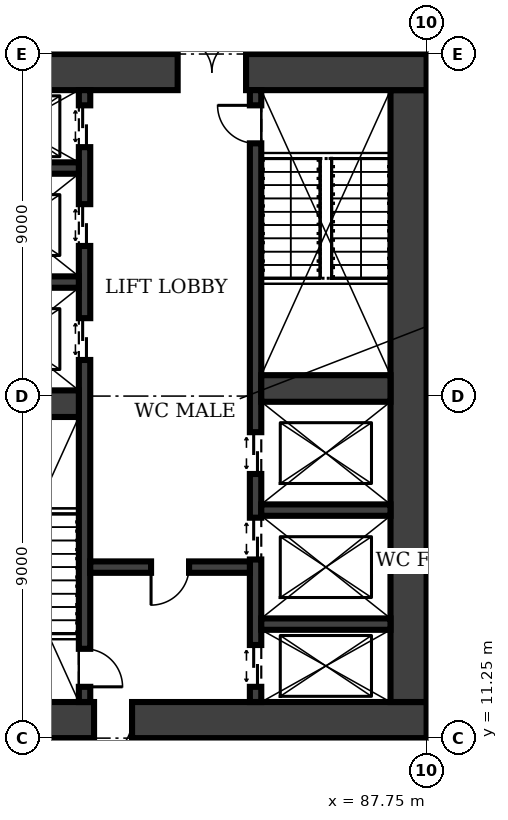
"""IFC4 building model, lengths in metres.
Left out: names, types, materials, properties, quantities, classifications, styles, units other than length and angle.
Written with IfcOpenShell. Run it as: python <this file> out.ifc"""

import sys

from ifc_helpers import new_model, si_unit, direction, frame, frame_2d, origin, place, context, subcontext, project, spatial, rectangle, extrude, element, fill, save


model = new_model("IFC4")
c1 = context("Model", 3, precision=1e-05, world=origin(), true_north=direction((0.0, 1.0)))
c2 = subcontext(c1, "Body", "Model", "MODEL_VIEW")
j1 = project(units=[si_unit("LENGTHUNIT", "METRE"), si_unit("PLANEANGLEUNIT", "RADIAN")], contexts=[c1])
p1 = place(None, origin())
s1 = spatial("IfcSite", under=j1, at=p1, CompositionType="ELEMENT")
p2 = place(p1, origin())
s2 = spatial("IfcBuilding", under=s1, at=p2, CompositionType="ELEMENT")
p3 = place(p2, origin())
s3 = spatial("IfcBuildingStorey", under=s2, at=p3, CompositionType="ELEMENT", Elevation=0.0)
p4 = place(p3, frame((74.25, 11.725, -0.4), z_axis=(0.0, 0.0, 1.0), x_axis=(1.0, 0.0, 0.0)))
e1 = element("IfcWall", 1, at=p4, inside=s3, PredefinedType="SHEAR", context=c2, shape_type="SweptSolid", body=[
    extrude(rectangle(XDim=13.5, YDim=0.95, at=frame_2d((6.75, 0.0))), origin(), (0.0, 0.0, 1.0), 6.4),
])
p5 = place(p4, frame((4.75, 0.0, 0.4)))
e2 = element("IfcOpeningElement", 2, at=p5, cuts=e1, PredefinedType="OPENING", context=c2, shape_type="SweptSolid", body=[
    extrude(rectangle(XDim=1.0, YDim=2.1, at=frame_2d((0.5, 1.05))), frame((0.0, 0.485, 0.0), z_axis=(0.0, -1.0, 0.0), x_axis=(1.0, 0.0, 0.0)), (0.0, 0.0, 1.0), 0.97),
])
p6 = place(p3, frame((87.275, 12.2, -0.4), z_axis=(0.0, 0.0, 1.0), x_axis=(0.0, 1.0, 0.0)))
e3 = element("IfcWall", 3, at=p6, inside=s3, PredefinedType="SHEAR", context=c2, shape_type="SweptSolid", body=[
    extrude(rectangle(XDim=16.1, YDim=0.95, at=frame_2d((8.05, 0.0))), origin(), (0.0, 0.0, 1.0), 6.4),
])
p7 = place(p3, frame((87.75, 28.775, -0.4), z_axis=(0.0, 0.0, 1.0), x_axis=(-1.0, 0.0, 0.0)))
e4 = element("IfcWall", 4, at=p7, inside=s3, PredefinedType="SHEAR", context=c2, shape_type="SweptSolid", body=[
    extrude(rectangle(XDim=13.5, YDim=0.95, at=frame_2d((6.75, 0.0))), origin(), (0.0, 0.0, 1.0), 6.4),
])
p8 = place(p7, frame((4.75, 0.0, 0.4)))
e5 = element("IfcOpeningElement", 5, at=p8, cuts=e4, PredefinedType="OPENING", context=c2, shape_type="SweptSolid", body=[
    extrude(rectangle(XDim=1.8, YDim=2.1, at=frame_2d((0.9, 1.05))), frame((0.0, 0.485, 0.0), z_axis=(0.0, -1.0, 0.0), x_axis=(1.0, 0.0, 0.0)), (0.0, 0.0, 1.0), 0.97),
])
p9 = place(p3, frame((78.75, 12.2, -0.4), z_axis=(0.0, 0.0, 1.0), x_axis=(0.0, 1.0, 0.0)))
e6 = element("IfcWall", 6, at=p9, inside=s3, PredefinedType="SHEAR", context=c2, shape_type="SweptSolid", body=[
    extrude(rectangle(XDim=16.1, YDim=0.3, at=frame_2d((8.05, 0.0))), origin(), (0.0, 0.0, 1.0), 6.4),
])
p10 = place(p9, frame((0.4, 0.0, 0.4)))
e7 = element("IfcOpeningElement", 7, at=p10, cuts=e6, PredefinedType="OPENING", context=c2, shape_type="SweptSolid", body=[
    extrude(rectangle(XDim=1.0, YDim=2.1, at=frame_2d((0.5, 1.05))), frame((0.0, 0.16, 0.0), z_axis=(0.0, -1.0, 0.0), x_axis=(1.0, 0.0, 0.0)), (0.0, 0.0, 1.0), 0.32),
])
p11 = place(p9, frame((9.0, 0.0, 0.4)))
e8 = element("IfcOpeningElement", 8, at=p11, cuts=e6, PredefinedType="OPENING", context=c2, shape_type="SweptSolid", body=[
    extrude(rectangle(XDim=1.1, YDim=2.1, at=frame_2d((0.55, 1.05))), frame((0.0, 0.16, 0.0), z_axis=(0.0, -1.0, 0.0), x_axis=(1.0, 0.0, 0.0)), (0.0, 0.0, 1.0), 0.32),
])
p12 = place(p9, frame((12.0, 0.0, 0.4)))
e9 = element("IfcOpeningElement", 9, at=p12, cuts=e6, PredefinedType="OPENING", context=c2, shape_type="SweptSolid", body=[
    extrude(rectangle(XDim=1.1, YDim=2.1, at=frame_2d((0.55, 1.05))), frame((0.0, 0.16, 0.0), z_axis=(0.0, -1.0, 0.0), x_axis=(1.0, 0.0, 0.0)), (0.0, 0.0, 1.0), 0.32),
])
p13 = place(p9, frame((14.6, 0.0, 0.4)))
e10 = element("IfcOpeningElement", 10, at=p13, cuts=e6, PredefinedType="OPENING", context=c2, shape_type="SweptSolid", body=[
    extrude(rectangle(XDim=1.1, YDim=2.1, at=frame_2d((0.55, 1.05))), frame((0.0, 0.16, 0.0), z_axis=(0.0, -1.0, 0.0), x_axis=(1.0, 0.0, 0.0)), (0.0, 0.0, 1.0), 0.32),
])
p14 = place(p3, frame((83.25, 12.2, -0.4), z_axis=(0.0, 0.0, 1.0), x_axis=(0.0, 1.0, 0.0)))
e11 = element("IfcWall", 11, at=p14, inside=s3, PredefinedType="SHEAR", context=c2, shape_type="SweptSolid", body=[
    extrude(rectangle(XDim=16.1, YDim=0.3, at=frame_2d((8.05, 0.0))), origin(), (0.0, 0.0, 1.0), 6.4),
])
p15 = place(p14, frame((14.7, 0.0, 0.4)))
e12 = element("IfcOpeningElement", 12, at=p15, cuts=e11, PredefinedType="OPENING", context=c2, shape_type="SweptSolid", body=[
    extrude(rectangle(XDim=1.0, YDim=2.1, at=frame_2d((0.5, 1.05))), frame((0.0, 0.16, 0.0), z_axis=(0.0, -1.0, 0.0), x_axis=(1.0, 0.0, 0.0)), (0.0, 0.0, 1.0), 0.32),
])
p16 = place(p14, frame((0.4, 0.0, 0.4)))
e13 = element("IfcOpeningElement", 13, at=p16, cuts=e11, PredefinedType="OPENING", context=c2, shape_type="SweptSolid", body=[
    extrude(rectangle(XDim=1.1, YDim=2.1, at=frame_2d((0.55, 1.05))), frame((0.0, 0.16, 0.0), z_axis=(0.0, -1.0, 0.0), x_axis=(1.0, 0.0, 0.0)), (0.0, 0.0, 1.0), 0.32),
])
p17 = place(p14, frame((3.75, 0.0, 0.4)))
e14 = element("IfcOpeningElement", 14, at=p17, cuts=e11, PredefinedType="OPENING", context=c2, shape_type="SweptSolid", body=[
    extrude(rectangle(XDim=1.1, YDim=2.1, at=frame_2d((0.55, 1.05))), frame((0.0, 0.16, 0.0), z_axis=(0.0, -1.0, 0.0), x_axis=(1.0, 0.0, 0.0)), (0.0, 0.0, 1.0), 0.32),
])
p18 = place(p14, frame((6.0, 0.0, 0.4)))
e15 = element("IfcOpeningElement", 15, at=p18, cuts=e11, PredefinedType="OPENING", context=c2, shape_type="SweptSolid", body=[
    extrude(rectangle(XDim=1.1, YDim=2.1, at=frame_2d((0.55, 1.05))), frame((0.0, 0.16, 0.0), z_axis=(0.0, -1.0, 0.0), x_axis=(1.0, 0.0, 0.0)), (0.0, 0.0, 1.0), 0.32),
])
p19 = place(p3, frame((75.2, 20.05, -0.4), z_axis=(0.0, 0.0, 1.0), x_axis=(1.0, 0.0, 0.0)))
e16 = element("IfcWall", 16, at=p19, inside=s3, PredefinedType="SHEAR", context=c2, shape_type="SweptSolid", body=[
    extrude(rectangle(XDim=3.4, YDim=0.7, at=frame_2d((1.7, 0.0))), origin(), (0.0, 0.0, 1.0), 6.4),
])
p20 = place(p3, frame((78.9, 15.75, -0.4), z_axis=(0.0, 0.0, 1.0), x_axis=(1.0, 0.0, 0.0)))
e17 = element("IfcWall", 17, at=p20, inside=s3, PredefinedType="SHEAR", context=c2, shape_type="SweptSolid", body=[
    extrude(rectangle(XDim=4.2, YDim=0.3, at=frame_2d((2.1, 0.0))), origin(), (0.0, 0.0, 1.0), 6.4),
])
p21 = place(p20, frame((1.6, 0.0, 0.4)))
e18 = element("IfcOpeningElement", 18, at=p21, cuts=e17, PredefinedType="OPENING", context=c2, shape_type="SweptSolid", body=[
    extrude(rectangle(XDim=1.0, YDim=2.1, at=frame_2d((0.5, 1.05))), frame((0.0, 0.16, 0.0), z_axis=(0.0, -1.0, 0.0), x_axis=(1.0, 0.0, 0.0)), (0.0, 0.0, 1.0), 0.32),
])
for number, where, z_axis, x_axis in (
    (19, (83.4, 14.25, -0.4), (0.0, 0.0, 1.0), (1.0, 0.0, 0.0)),
    (20, (83.4, 17.25, -0.4), (0.0, 0.0, 1.0), (1.0, 0.0, 0.0)),
):
    element("IfcWall", number, at=place(p3, frame(where, z_axis=z_axis, x_axis=x_axis)), inside=s3, PredefinedType="SHEAR", context=c2, shape_type="SweptSolid", body=[
        extrude(rectangle(XDim=3.4, YDim=0.3, at=frame_2d((1.7, 0.0))), origin(), (0.0, 0.0, 1.0), 6.4),
    ])
p22 = place(p3, frame((83.4, 20.45, -0.4), z_axis=(0.0, 0.0, 1.0), x_axis=(1.0, 0.0, 0.0)))
e21 = element("IfcWall", 21, at=p22, inside=s3, PredefinedType="SHEAR", context=c2, shape_type="SweptSolid", body=[
    extrude(rectangle(XDim=3.4, YDim=0.7, at=frame_2d((1.7, 0.0))), origin(), (0.0, 0.0, 1.0), 6.4),
])
for number, where, z_axis, x_axis in (
    (22, (75.2, 23.25, -0.4), (0.0, 0.0, 1.0), (1.0, 0.0, 0.0)),
    (23, (75.2, 26.25, -0.4), (0.0, 0.0, 1.0), (1.0, 0.0, 0.0)),
):
    element("IfcWall", number, at=place(p3, frame(where, z_axis=z_axis, x_axis=x_axis)), inside=s3, PredefinedType="SHEAR", context=c2, shape_type="SweptSolid", body=[
        extrude(rectangle(XDim=3.4, YDim=0.3, at=frame_2d((1.7, 0.0))), origin(), (0.0, 0.0, 1.0), 6.4),
    ])
p23 = place(p5, frame((1.0, 0.0, 0.0), z_axis=(0.0, 0.0, 1.0), x_axis=(-1.0, 0.0, 0.0)))
e24 = element("IfcDoor", 24, at=p23, inside=s3, OperationType="SINGLE_SWING_RIGHT", PredefinedType="DOOR", context=c2, shape_type="SweptSolid", body=[
    extrude(rectangle(XDim=1.0, YDim=2.1, at=frame_2d((0.5, 1.05))), frame((0.0, 0.025, 0.0), z_axis=(0.0, -1.0, 0.0), x_axis=(1.0, 0.0, 0.0)), (0.0, 0.0, 1.0), 0.05),
])
fill(e2, e24)
p24 = place(p8, frame((1.8, 0.0, 0.0), z_axis=(0.0, 0.0, 1.0), x_axis=(-1.0, 0.0, 0.0)))
e25 = element("IfcDoor", 25, at=p24, inside=s3, OperationType="DOUBLE_DOOR_SINGLE_SWING", PredefinedType="DOOR", context=c2, shape_type="SweptSolid", body=[
    extrude(rectangle(XDim=1.8, YDim=2.1, at=frame_2d((0.9, 1.05))), frame((0.0, 0.025, 0.0), z_axis=(0.0, -1.0, 0.0), x_axis=(1.0, 0.0, 0.0)), (0.0, 0.0, 1.0), 0.05),
])
fill(e5, e25)
p25 = place(p21, frame((1.0, 0.0, 0.0), z_axis=(0.0, 0.0, 1.0), x_axis=(-1.0, 0.0, 0.0)))
e26 = element("IfcDoor", 26, at=p25, inside=s3, OperationType="SINGLE_SWING_RIGHT", PredefinedType="DOOR", context=c2, shape_type="SweptSolid", body=[
    extrude(rectangle(XDim=1.0, YDim=2.1, at=frame_2d((0.5, 1.05))), frame((0.0, 0.025, 0.0), z_axis=(0.0, -1.0, 0.0), x_axis=(1.0, 0.0, 0.0)), (0.0, 0.0, 1.0), 0.05),
])
fill(e18, e26)
p26 = place(p10, frame((1.0, 0.0, 0.0), z_axis=(0.0, 0.0, 1.0), x_axis=(-1.0, 0.0, 0.0)))
e27 = element("IfcDoor", 27, at=p26, inside=s3, OperationType="SINGLE_SWING_RIGHT", PredefinedType="DOOR", context=c2, shape_type="SweptSolid", body=[
    extrude(rectangle(XDim=1.0, YDim=2.1, at=frame_2d((0.5, 1.05))), frame((0.0, 0.025, 0.0), z_axis=(0.0, -1.0, 0.0), x_axis=(1.0, 0.0, 0.0)), (0.0, 0.0, 1.0), 0.05),
])
fill(e7, e27)
p27 = place(p15, origin())
e28 = element("IfcDoor", 28, at=p27, inside=s3, OperationType="SINGLE_SWING_RIGHT", PredefinedType="DOOR", context=c2, shape_type="SweptSolid", body=[
    extrude(rectangle(XDim=1.0, YDim=2.1, at=frame_2d((0.5, 1.05))), frame((0.0, 0.025, 0.0), z_axis=(0.0, -1.0, 0.0), x_axis=(1.0, 0.0, 0.0)), (0.0, 0.0, 1.0), 0.05),
])
fill(e12, e28)
p28 = place(p16, origin())
e29 = element("IfcDoor", 29, at=p28, inside=s3, OperationType="DOUBLE_DOOR_SLIDING", PredefinedType="DOOR", context=c2, shape_type="SweptSolid", body=[
    extrude(rectangle(XDim=1.1, YDim=2.1, at=frame_2d((0.55, 1.05))), frame((0.0, 0.025, 0.0), z_axis=(0.0, -1.0, 0.0), x_axis=(1.0, 0.0, 0.0)), (0.0, 0.0, 1.0), 0.05),
])
fill(e13, e29)
p29 = place(p11, origin())
e30 = element("IfcDoor", 30, at=p29, inside=s3, OperationType="DOUBLE_DOOR_SLIDING", PredefinedType="DOOR", context=c2, shape_type="SweptSolid", body=[
    extrude(rectangle(XDim=1.1, YDim=2.1, at=frame_2d((0.55, 1.05))), frame((0.0, 0.025, 0.0), z_axis=(0.0, -1.0, 0.0), x_axis=(1.0, 0.0, 0.0)), (0.0, 0.0, 1.0), 0.05),
])
fill(e8, e30)
p30 = place(p12, origin())
e31 = element("IfcDoor", 31, at=p30, inside=s3, OperationType="DOUBLE_DOOR_SLIDING", PredefinedType="DOOR", context=c2, shape_type="SweptSolid", body=[
    extrude(rectangle(XDim=1.1, YDim=2.1, at=frame_2d((0.55, 1.05))), frame((0.0, 0.025, 0.0), z_axis=(0.0, -1.0, 0.0), x_axis=(1.0, 0.0, 0.0)), (0.0, 0.0, 1.0), 0.05),
])
fill(e9, e31)
p31 = place(p13, origin())
e32 = element("IfcDoor", 32, at=p31, inside=s3, OperationType="DOUBLE_DOOR_SLIDING", PredefinedType="DOOR", context=c2, shape_type="SweptSolid", body=[
    extrude(rectangle(XDim=1.1, YDim=2.1, at=frame_2d((0.55, 1.05))), frame((0.0, 0.025, 0.0), z_axis=(0.0, -1.0, 0.0), x_axis=(1.0, 0.0, 0.0)), (0.0, 0.0, 1.0), 0.05),
])
fill(e10, e32)
p32 = place(p17, origin())
e33 = element("IfcDoor", 33, at=p32, inside=s3, OperationType="DOUBLE_DOOR_SLIDING", PredefinedType="DOOR", context=c2, shape_type="SweptSolid", body=[
    extrude(rectangle(XDim=1.1, YDim=2.1, at=frame_2d((0.55, 1.05))), frame((0.0, 0.025, 0.0), z_axis=(0.0, -1.0, 0.0), x_axis=(1.0, 0.0, 0.0)), (0.0, 0.0, 1.0), 0.05),
])
fill(e14, e33)
p33 = place(p18, origin())
e34 = element("IfcDoor", 34, at=p33, inside=s3, OperationType="DOUBLE_DOOR_SLIDING", PredefinedType="DOOR", context=c2, shape_type="SweptSolid", body=[
    extrude(rectangle(XDim=1.1, YDim=2.1, at=frame_2d((0.55, 1.05))), frame((0.0, 0.025, 0.0), z_axis=(0.0, -1.0, 0.0), x_axis=(1.0, 0.0, 0.0)), (0.0, 0.0, 1.0), 0.05),
])
fill(e15, e34)
save(model, sys.argv[1])
